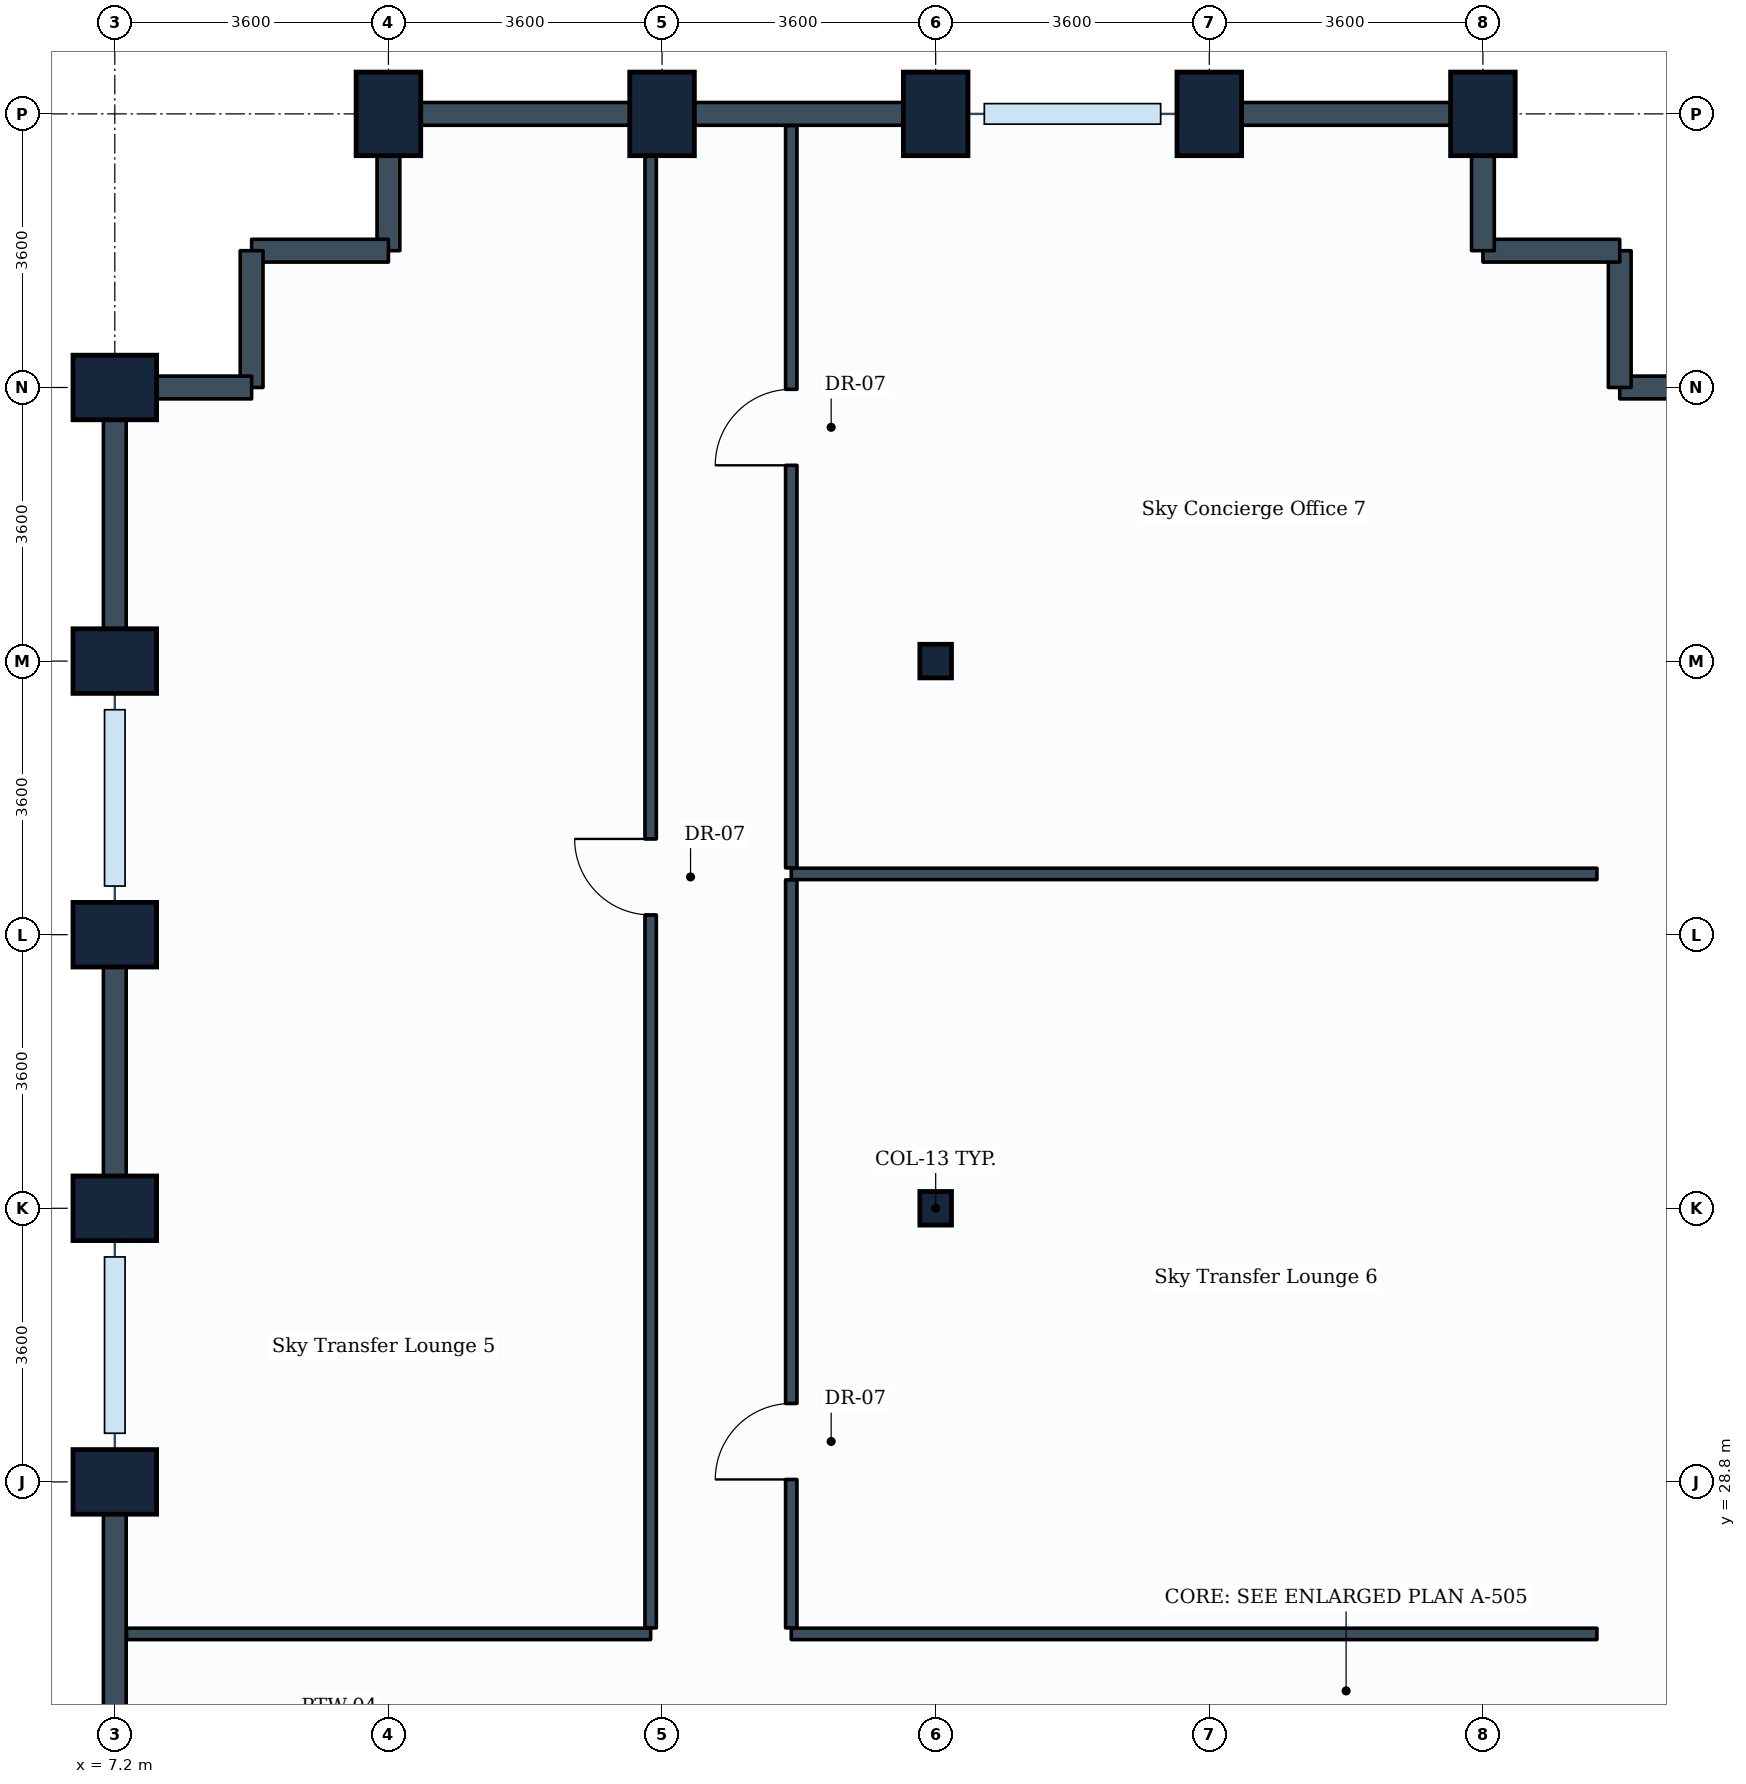
"""IFC4 building model, lengths in metres.
Left out: names, types, materials, properties, quantities, classifications, styles, units other than length and angle.
Written with IfcOpenShell. Run it as: python <this file> out.ifc"""

import sys

from ifc_helpers import new_model, si_unit, direction, frame, frame_2d, origin, origin_2d, place, context, subcontext, project, spatial, rectangle, i_section, extrude, element, fill, save


model = new_model("IFC4")
c1 = context("Model", 3, precision=1e-05, world=origin(), true_north=direction((0.0, 1.0)))
c2 = subcontext(c1, "Body", "Model", "MODEL_VIEW")
j1 = project(units=[si_unit("LENGTHUNIT", "METRE"), si_unit("PLANEANGLEUNIT", "RADIAN")], contexts=[c1])
p1 = place(None, origin())
s1 = spatial("IfcSite", under=j1, at=p1, CompositionType="ELEMENT")
p2 = place(p1, origin())
s2 = spatial("IfcBuilding", under=s1, at=p2, CompositionType="ELEMENT")
p3 = place(p2, frame((0.0, 0.0, 115.2)))
s3 = spatial("IfcBuildingStorey", under=s2, at=p3, CompositionType="ELEMENT", Elevation=115.2)
for number, where, z_axis, x_axis in (
    (1, (7.2, 28.8, 0.0), (0.0, 0.0, 1.0), (0.0, 1.0, 0.0)),
    (2, (7.2, 32.4, 0.0), (0.0, 0.0, 1.0), (0.0, 1.0, 0.0)),
    (3, (7.2, 36.0, 0.0), (0.0, 0.0, 1.0), (0.0, 1.0, 0.0)),
    (4, (7.2, 39.6, 0.0), (0.0, 0.0, 1.0), (0.0, 1.0, 0.0)),
    (5, (7.2, 43.2, 0.0), (0.0, 0.0, 1.0), (0.0, 1.0, 0.0)),
    (6, (10.8, 46.8, 0.0), (0.0, 0.0, 1.0), (1.0, 0.0, 0.0)),
    (7, (14.4, 46.8, 0.0), (0.0, 0.0, 1.0), (1.0, 0.0, 0.0)),
):
    element("IfcColumn", number, at=place(p3, frame(where, z_axis=z_axis, x_axis=x_axis)), inside=s3, PredefinedType="COLUMN", context=c2, shape_type="SweptSolid", body=[
        extrude(rectangle(XDim=0.85, YDim=1.1, at=origin_2d()), origin(), (0.0, 0.0, 1.0), 4.8),
    ])
for number, where, z_axis, x_axis in (
    (8, (18.0, 32.4, 0.0), (0.0, 0.0, 1.0), (1.0, 0.0, 0.0)),
    (9, (18.0, 39.6, 0.0), (0.0, 0.0, 1.0), (1.0, 0.0, 0.0)),
):
    element("IfcColumn", number, at=place(p3, frame(where, z_axis=z_axis, x_axis=x_axis)), inside=s3, PredefinedType="COLUMN", context=c2, shape_type="SweptSolid", body=[
        extrude(i_section(OverallWidth=0.416, OverallDepth=0.442, WebThickness=0.025, FlangeThickness=0.041, FilletRadius=0.015, at=origin_2d()), origin(), (0.0, 0.0, 1.0), 4.8),
    ])
for number, where, z_axis, x_axis in (
    (10, (18.0, 46.8, 0.0), (0.0, 0.0, 1.0), (1.0, 0.0, 0.0)),
    (11, (21.6, 46.8, 0.0), (0.0, 0.0, 1.0), (1.0, 0.0, 0.0)),
    (12, (25.2, 46.8, 0.0), (0.0, 0.0, 1.0), (1.0, 0.0, 0.0)),
):
    element("IfcColumn", number, at=place(p3, frame(where, z_axis=z_axis, x_axis=x_axis)), inside=s3, PredefinedType="COLUMN", context=c2, shape_type="SweptSolid", body=[
        extrude(rectangle(XDim=0.85, YDim=1.1, at=origin_2d()), origin(), (0.0, 0.0, 1.0), 4.8),
    ])
p4 = place(p3, frame((27.0, 43.2, 0.0), z_axis=(0.0, 0.0, 1.0), x_axis=(1.0, 0.0, 0.0)))
e13 = element("IfcWall", 13, at=p4, inside=s3, PredefinedType="STANDARD", context=c2, shape_type="SweptSolid", body=[
    extrude(rectangle(XDim=1.8, YDim=0.3, at=frame_2d((0.9, 0.0))), origin(), (0.0, 0.0, 1.0), 3.93),
])
for number, where, z_axis, x_axis in (
    (14, (27.0, 43.2, 0.0), (0.0, 0.0, 1.0), (0.0, 1.0, 0.0)),
    (15, (25.2, 45.0, 0.0), (0.0, 0.0, 1.0), (1.0, 0.0, 0.0)),
):
    element("IfcWall", number, at=place(p3, frame(where, z_axis=z_axis, x_axis=x_axis)), inside=s3, PredefinedType="STANDARD", context=c2, shape_type="SweptSolid", body=[
        extrude(rectangle(XDim=1.8, YDim=0.3, at=frame_2d((0.9, 0.0))), origin(), (0.0, 0.0, 1.0), 4.535),
    ])
p5 = place(p3, frame((25.2, 45.0, 0.0), z_axis=(0.0, 0.0, 1.0), x_axis=(0.0, 1.0, 0.0)))
e16 = element("IfcWall", 16, at=p5, inside=s3, PredefinedType="STANDARD", context=c2, shape_type="SweptSolid", body=[
    extrude(rectangle(XDim=1.8, YDim=0.3, at=frame_2d((0.9, 0.0))), origin(), (0.0, 0.0, 1.0), 3.93),
])
p6 = place(p3, frame((21.6, 46.8, 0.0), z_axis=(0.0, 0.0, 1.0), x_axis=(1.0, 0.0, 0.0)))
e17 = element("IfcWall", 17, at=p6, inside=s3, PredefinedType="STANDARD", context=c2, shape_type="SweptSolid", body=[
    extrude(rectangle(XDim=3.6, YDim=0.3, at=frame_2d((1.8, 0.0))), origin(), (0.0, 0.0, 1.0), 3.93),
])
p7 = place(p3, frame((14.4, 46.8, 0.0), z_axis=(0.0, 0.0, 1.0), x_axis=(1.0, 0.0, 0.0)))
e18 = element("IfcWall", 18, at=p7, inside=s3, PredefinedType="STANDARD", context=c2, shape_type="SweptSolid", body=[
    extrude(rectangle(XDim=3.6, YDim=0.3, at=frame_2d((1.8, 0.0))), origin(), (0.0, 0.0, 1.0), 3.93),
])
p8 = place(p3, frame((10.8, 46.8, 0.0), z_axis=(0.0, 0.0, 1.0), x_axis=(1.0, 0.0, 0.0)))
e19 = element("IfcWall", 19, at=p8, inside=s3, PredefinedType="STANDARD", context=c2, shape_type="SweptSolid", body=[
    extrude(rectangle(XDim=3.6, YDim=0.3, at=frame_2d((1.8, 0.0))), origin(), (0.0, 0.0, 1.0), 3.93),
])
p9 = place(p3, frame((10.8, 45.0, 0.0), z_axis=(0.0, 0.0, 1.0), x_axis=(0.0, 1.0, 0.0)))
e20 = element("IfcWall", 20, at=p9, inside=s3, PredefinedType="STANDARD", context=c2, shape_type="SweptSolid", body=[
    extrude(rectangle(XDim=1.8, YDim=0.3, at=frame_2d((0.9, 0.0))), origin(), (0.0, 0.0, 1.0), 3.93),
])
for number, where, z_axis, x_axis in (
    (21, (9.0, 45.0, 0.0), (0.0, 0.0, 1.0), (1.0, 0.0, 0.0)),
    (22, (9.0, 43.2, 0.0), (0.0, 0.0, 1.0), (0.0, 1.0, 0.0)),
):
    element("IfcWall", number, at=place(p3, frame(where, z_axis=z_axis, x_axis=x_axis)), inside=s3, PredefinedType="STANDARD", context=c2, shape_type="SweptSolid", body=[
        extrude(rectangle(XDim=1.8, YDim=0.3, at=frame_2d((0.9, 0.0))), origin(), (0.0, 0.0, 1.0), 4.535),
    ])
p10 = place(p3, frame((7.2, 43.2, 0.0), z_axis=(0.0, 0.0, 1.0), x_axis=(1.0, 0.0, 0.0)))
e23 = element("IfcWall", 23, at=p10, inside=s3, PredefinedType="STANDARD", context=c2, shape_type="SweptSolid", body=[
    extrude(rectangle(XDim=1.8, YDim=0.3, at=frame_2d((0.9, 0.0))), origin(), (0.0, 0.0, 1.0), 3.93),
])
p11 = place(p3, frame((7.2, 39.6, 0.0), z_axis=(0.0, 0.0, 1.0), x_axis=(0.0, 1.0, 0.0)))
e24 = element("IfcWall", 24, at=p11, inside=s3, PredefinedType="STANDARD", context=c2, shape_type="SweptSolid", body=[
    extrude(rectangle(XDim=3.6, YDim=0.3, at=frame_2d((1.8, 0.0))), origin(), (0.0, 0.0, 1.0), 3.93),
])
for number, where, z_axis, x_axis in (
    (25, (7.2, 32.4, 0.0), (0.0, 0.0, 1.0), (0.0, 1.0, 0.0)),
    (26, (7.2, 25.2, 0.0), (0.0, 0.0, 1.0), (0.0, 1.0, 0.0)),
):
    element("IfcWall", number, at=place(p3, frame(where, z_axis=z_axis, x_axis=x_axis)), inside=s3, PredefinedType="STANDARD", context=c2, shape_type="SweptSolid", body=[
        extrude(rectangle(XDim=3.6, YDim=0.3, at=frame_2d((1.8, 0.0))), origin(), (0.0, 0.0, 1.0), 3.93),
    ])
p12 = place(p3, frame((7.354, 26.8, 0.0), z_axis=(0.0, 0.0, 1.0), x_axis=(1.0, 0.0, 0.0)))
e27 = element("IfcWall", 27, at=p12, inside=s3, PredefinedType="PARTITIONING", context=c2, shape_type="SweptSolid", body=[
    extrude(rectangle(XDim=6.896, YDim=0.15, at=frame_2d((3.448, 0.0))), origin(), (0.0, 0.0, 1.0), 3.93),
])
p13 = place(p3, frame((14.25, 26.879, 0.0), z_axis=(0.0, 0.0, 1.0), x_axis=(0.0, 1.0, 0.0)))
e28 = element("IfcWall", 28, at=p13, inside=s3, PredefinedType="PARTITIONING", context=c2, shape_type="SweptSolid", body=[
    extrude(rectangle(XDim=19.767, YDim=0.15, at=frame_2d((9.884, 0.0))), origin(), (0.0, 0.0, 1.0), 3.93),
])
p14 = place(p13, frame((9.381, 0.0, 0.0)))
e29 = element("IfcOpeningElement", 29, at=p14, cuts=e28, PredefinedType="OPENING", context=c2, shape_type="SweptSolid", body=[
    extrude(rectangle(XDim=1.0, YDim=2.1, at=frame_2d((0.5, 1.05))), frame((0.0, 0.085, 0.0), z_axis=(0.0, -1.0, 0.0), x_axis=(1.0, 0.0, 0.0)), (0.0, 0.0, 1.0), 0.17),
])
for number, where, z_axis, x_axis in (
    (30, (16.1, 26.8, 0.0), (0.0, 0.0, 1.0), (1.0, 0.0, 0.0)),
    (31, (16.1, 36.8, 0.0), (0.0, 0.0, 1.0), (1.0, 0.0, 0.0)),
):
    element("IfcWall", number, at=place(p3, frame(where, z_axis=z_axis, x_axis=x_axis)), inside=s3, PredefinedType="PARTITIONING", context=c2, shape_type="SweptSolid", body=[
        extrude(rectangle(XDim=10.6, YDim=0.15, at=frame_2d((5.3, 0.0))), origin(), (0.0, 0.0, 1.0), 4.08),
    ])
p15 = place(p3, frame((16.1, 26.879, 0.0), z_axis=(0.0, 0.0, 1.0), x_axis=(0.0, 1.0, 0.0)))
e32 = element("IfcWall", 32, at=p15, inside=s3, PredefinedType="PARTITIONING", context=c2, shape_type="SweptSolid", body=[
    extrude(rectangle(XDim=9.842, YDim=0.15, at=frame_2d((4.921, 0.0))), origin(), (0.0, 0.0, 1.0), 4.09),
])
p16 = place(p15, frame((1.953, 0.0, 0.0)))
e33 = element("IfcOpeningElement", 33, at=p16, cuts=e32, PredefinedType="OPENING", context=c2, shape_type="SweptSolid", body=[
    extrude(rectangle(XDim=1.0, YDim=2.1, at=frame_2d((0.5, 1.05))), frame((0.0, 0.085, 0.0), z_axis=(0.0, -1.0, 0.0), x_axis=(1.0, 0.0, 0.0)), (0.0, 0.0, 1.0), 0.17),
])
p17 = place(p3, frame((16.1, 36.879, 0.0), z_axis=(0.0, 0.0, 1.0), x_axis=(0.0, 1.0, 0.0)))
e34 = element("IfcWall", 34, at=p17, inside=s3, PredefinedType="PARTITIONING", context=c2, shape_type="SweptSolid", body=[
    extrude(rectangle(XDim=9.767, YDim=0.15, at=frame_2d((4.884, 0.0))), origin(), (0.0, 0.0, 1.0), 3.93),
])
p18 = place(p17, frame((5.297, 0.0, 0.0)))
e35 = element("IfcOpeningElement", 35, at=p18, cuts=e34, PredefinedType="OPENING", context=c2, shape_type="SweptSolid", body=[
    extrude(rectangle(XDim=1.0, YDim=2.1, at=frame_2d((0.5, 1.05))), frame((0.0, 0.085, 0.0), z_axis=(0.0, -1.0, 0.0), x_axis=(1.0, 0.0, 0.0)), (0.0, 0.0, 1.0), 0.17),
])
p19 = place(p14, origin())
e36 = element("IfcDoor", 36, at=p19, inside=s3, OperationType="SINGLE_SWING_RIGHT", PredefinedType="DOOR", context=c2, shape_type="SweptSolid", body=[
    extrude(rectangle(XDim=1.0, YDim=2.1, at=frame_2d((0.5, 1.05))), frame((0.0, 0.025, 0.0), z_axis=(0.0, -1.0, 0.0), x_axis=(1.0, 0.0, 0.0)), (0.0, 0.0, 1.0), 0.05),
])
fill(e29, e36)
p20 = place(p16, origin())
e37 = element("IfcDoor", 37, at=p20, inside=s3, OperationType="SINGLE_SWING_LEFT", PredefinedType="DOOR", context=c2, shape_type="SweptSolid", body=[
    extrude(rectangle(XDim=1.0, YDim=2.1, at=frame_2d((0.5, 1.05))), frame((0.0, 0.025, 0.0), z_axis=(0.0, -1.0, 0.0), x_axis=(1.0, 0.0, 0.0)), (0.0, 0.0, 1.0), 0.05),
])
fill(e33, e37)
p21 = place(p18, origin())
e38 = element("IfcDoor", 38, at=p21, inside=s3, OperationType="SINGLE_SWING_LEFT", PredefinedType="DOOR", context=c2, shape_type="SweptSolid", body=[
    extrude(rectangle(XDim=1.0, YDim=2.1, at=frame_2d((0.5, 1.05))), frame((0.0, 0.025, 0.0), z_axis=(0.0, -1.0, 0.0), x_axis=(1.0, 0.0, 0.0)), (0.0, 0.0, 1.0), 0.05),
])
fill(e35, e38)
save(model, sys.argv[1])
